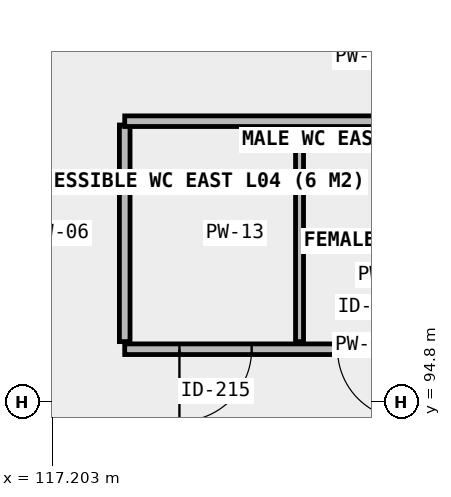
"""IFC4 building model, lengths in metres.
Left out: names, types, materials, properties, quantities, classifications, styles, units other than length and angle.
Written with IfcOpenShell. Run it as: python <this file> out.ifc"""

import sys

from ifc_helpers import new_model, si_unit, direction, frame, frame_2d, origin, place, context, subcontext, project, spatial, rectangle, extrude, element, fill, save


model = new_model("IFC4")
c1 = context("Model", 3, precision=1e-05, world=origin(), true_north=direction((0.0, 1.0)))
c2 = subcontext(c1, "Body", "Model", "MODEL_VIEW")
j1 = project(units=[si_unit("LENGTHUNIT", "METRE"), si_unit("PLANEANGLEUNIT", "RADIAN")], contexts=[c1])
p1 = place(None, origin())
s1 = spatial("IfcSite", under=j1, at=p1, CompositionType="ELEMENT")
p2 = place(p1, origin())
s2 = spatial("IfcBuilding", under=s1, at=p2, CompositionType="ELEMENT")
p3 = place(p2, frame((0.0, 0.0, 18.3)))
s3 = spatial("IfcBuildingStorey", under=s2, at=p3, CompositionType="ELEMENT", Elevation=18.3)
p4 = place(p3, frame((118.15, 95.5, 0.0), z_axis=(0.0, 0.0, 1.0), x_axis=(1.0, 0.0, 0.0)))
e1 = element("IfcWall", 1, at=p4, inside=s3, PredefinedType="PLUMBINGWALL", context=c2, shape_type="SweptSolid", body=[
    extrude(rectangle(XDim=6.3, YDim=0.14, at=frame_2d((3.15, 0.0))), origin(), (0.0, 0.0, 1.0), 3.88),
])
p5 = place(p4, frame((0.72, 0.0, 0.0)))
e2 = element("IfcOpeningElement", 2, at=p5, cuts=e1, PredefinedType="OPENING", context=c2, shape_type="SweptSolid", body=[
    extrude(rectangle(XDim=0.95, YDim=2.1, at=frame_2d((0.475, 1.05))), frame((0.0, 0.08, 0.0), z_axis=(0.0, -1.0, 0.0), x_axis=(1.0, 0.0, 0.0)), (0.0, 0.0, 1.0), 0.16),
])
p6 = place(p4, frame((2.8, 0.0, 0.0)))
e3 = element("IfcOpeningElement", 3, at=p6, cuts=e1, PredefinedType="OPENING", context=c2, shape_type="SweptSolid", body=[
    extrude(rectangle(XDim=0.92, YDim=2.1, at=frame_2d((0.46, 1.05))), frame((0.0, 0.08, 0.0), z_axis=(0.0, -1.0, 0.0), x_axis=(1.0, 0.0, 0.0)), (0.0, 0.0, 1.0), 0.16),
])
p7 = place(p4, frame((4.8, 0.0, 0.0)))
e4 = element("IfcOpeningElement", 4, at=p7, cuts=e1, PredefinedType="OPENING", context=c2, shape_type="SweptSolid", body=[
    extrude(rectangle(XDim=0.92, YDim=2.1, at=frame_2d((0.46, 1.05))), frame((0.0, 0.08, 0.0), z_axis=(0.0, -1.0, 0.0), x_axis=(1.0, 0.0, 0.0)), (0.0, 0.0, 1.0), 0.16),
])
p8 = place(p3, frame((118.15, 95.6, 0.0), z_axis=(0.0, 0.0, 1.0), x_axis=(0.0, 1.0, 0.0)))
e5 = element("IfcWall", 5, at=p8, inside=s3, PredefinedType="PLUMBINGWALL", context=c2, shape_type="SweptSolid", body=[
    extrude(rectangle(XDim=2.85, YDim=0.14, at=frame_2d((1.425, 0.0))), origin(), (0.0, 0.0, 1.0), 3.88),
])
p9 = place(p3, frame((120.45, 95.6, 0.0), z_axis=(0.0, 0.0, 1.0), x_axis=(0.0, 1.0, 0.0)))
e6 = element("IfcWall", 6, at=p9, inside=s3, PredefinedType="PARTITIONING", context=c2, shape_type="SweptSolid", body=[
    extrude(rectangle(XDim=2.85, YDim=0.105, at=frame_2d((1.425, 0.0))), origin(), (0.0, 0.0, 1.0), 3.88),
])
p10 = place(p3, frame((118.15, 98.5, 0.0), z_axis=(0.0, 0.0, 1.0), x_axis=(1.0, 0.0, 0.0)))
e7 = element("IfcWall", 7, at=p10, inside=s3, PredefinedType="PLUMBINGWALL", context=c2, shape_type="SweptSolid", body=[
    extrude(rectangle(XDim=6.3, YDim=0.14, at=frame_2d((3.15, 0.0))), origin(), (0.0, 0.0, 1.0), 3.88),
])
p11 = place(p5, frame((0.475, 0.0, 0.0), z_axis=(0.0, 0.0, 1.0), x_axis=(-1.0, 0.0, 0.0)))
e8 = element("IfcDoor", 8, at=p11, inside=s3, OperationType="SINGLE_SWING_LEFT", PredefinedType="DOOR", context=c2, shape_type="SweptSolid", body=[
    extrude(rectangle(XDim=0.95, YDim=2.1, at=frame_2d((0.0, 1.05))), frame((0.0, 0.025, 0.0), z_axis=(0.0, -1.0, 0.0), x_axis=(1.0, 0.0, 0.0)), (0.0, 0.0, 1.0), 0.05),
])
fill(e2, e8)
p12 = place(p6, origin())
e9 = element("IfcDoor", 9, at=p12, inside=s3, OperationType="SINGLE_SWING_RIGHT", PredefinedType="DOOR", context=c2, shape_type="SweptSolid", body=[
    extrude(rectangle(XDim=0.92, YDim=2.1, at=frame_2d((0.46, 1.05))), frame((0.0, 0.025, 0.0), z_axis=(0.0, -1.0, 0.0), x_axis=(1.0, 0.0, 0.0)), (0.0, 0.0, 1.0), 0.05),
])
fill(e3, e9)
save(model, sys.argv[1])
